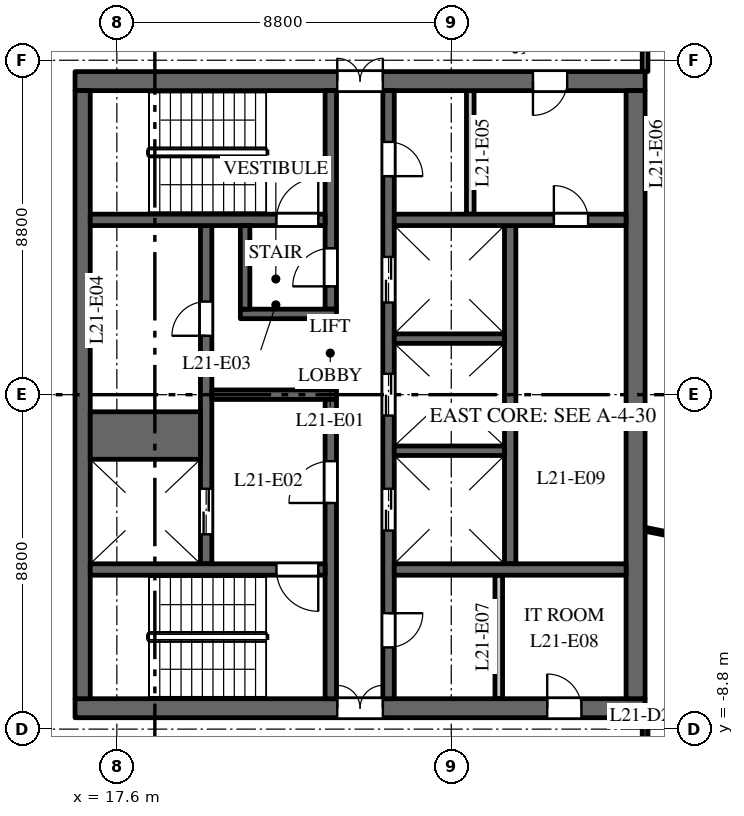
"""IFC4 building model, lengths in metres.
Left out: names, types, materials, properties, quantities, classifications, styles, units other than length and angle.
Written with IfcOpenShell. Run it as: python <this file> out.ifc"""

import sys

from ifc_helpers import new_model, si_unit, direction, frame, frame_2d, origin, place, context, subcontext, project, spatial, rectangle, extrude, element, fill, save


model = new_model("IFC4")
c1 = context("Model", 3, precision=1e-05, world=origin(), true_north=direction((0.0, 1.0)))
c2 = subcontext(c1, "Body", "Model", "MODEL_VIEW")
j1 = project(units=[si_unit("LENGTHUNIT", "METRE"), si_unit("PLANEANGLEUNIT", "RADIAN")], contexts=[c1])
p1 = place(None, origin())
s1 = spatial("IfcSite", under=j1, at=p1, CompositionType="ELEMENT")
p2 = place(p1, origin())
s2 = spatial("IfcBuilding", under=s1, at=p2, CompositionType="ELEMENT")
p3 = place(p2, frame((0.0, 0.0, 96.0)))
s3 = spatial("IfcBuildingStorey", under=s2, at=p3, CompositionType="ELEMENT", Elevation=96.0)
p4 = place(p3, frame((16.5, 8.25, 0.0), z_axis=(0.0, 0.0, 1.0), x_axis=(1.0, 0.0, 0.0)))
e1 = element("IfcWall", 1, at=p4, inside=s3, PredefinedType="SHEAR", context=c2, shape_type="SweptSolid", body=[
    extrude(rectangle(XDim=15.0, YDim=0.5, at=frame_2d((7.5, 0.0))), origin(), (0.0, 0.0, 1.0), 3.7),
])
p5 = place(p4, frame((6.9, 0.0, 0.0)))
e2 = element("IfcOpeningElement", 2, at=p5, cuts=e1, PredefinedType="OPENING", context=c2, shape_type="SweptSolid", body=[
    extrude(rectangle(XDim=1.2, YDim=2.1, at=frame_2d((0.6, 1.05))), frame((0.0, 0.26, 0.0), z_axis=(0.0, -1.0, 0.0), x_axis=(1.0, 0.0, 0.0)), (0.0, 0.0, 1.0), 0.52),
])
p6 = place(p4, frame((12.05, 0.0, 0.0)))
e3 = element("IfcOpeningElement", 3, at=p6, cuts=e1, PredefinedType="OPENING", context=c2, shape_type="SweptSolid", body=[
    extrude(rectangle(XDim=0.9, YDim=2.1, at=frame_2d((0.45, 1.05))), frame((0.0, 0.26, 0.0), z_axis=(0.0, -1.0, 0.0), x_axis=(1.0, 0.0, 0.0)), (0.0, 0.0, 1.0), 0.52),
])
p7 = place(p3, frame((16.5, -8.25, 0.0), z_axis=(0.0, 0.0, 1.0), x_axis=(1.0, 0.0, 0.0)))
e4 = element("IfcWall", 4, at=p7, inside=s3, PredefinedType="SHEAR", context=c2, shape_type="SweptSolid", body=[
    extrude(rectangle(XDim=15.0, YDim=0.5, at=frame_2d((7.5, 0.0))), origin(), (0.0, 0.0, 1.0), 3.7),
])
p8 = place(p7, frame((6.9, 0.0, 0.0)))
e5 = element("IfcOpeningElement", 5, at=p8, cuts=e4, PredefinedType="OPENING", context=c2, shape_type="SweptSolid", body=[
    extrude(rectangle(XDim=1.2, YDim=2.1, at=frame_2d((0.6, 1.05))), frame((0.0, 0.26, 0.0), z_axis=(0.0, -1.0, 0.0), x_axis=(1.0, 0.0, 0.0)), (0.0, 0.0, 1.0), 0.52),
])
p9 = place(p7, frame((12.425, 0.0, 0.0)))
e6 = element("IfcOpeningElement", 6, at=p9, cuts=e4, PredefinedType="OPENING", context=c2, shape_type="SweptSolid", body=[
    extrude(rectangle(XDim=0.9, YDim=2.1, at=frame_2d((0.45, 1.05))), frame((0.0, 0.26, 0.0), z_axis=(0.0, -1.0, 0.0), x_axis=(1.0, 0.0, 0.0)), (0.0, 0.0, 1.0), 0.52),
])
p10 = place(p3, frame((27.95, -4.45, 0.0), z_axis=(0.0, 0.0, 1.0), x_axis=(0.0, 1.0, 0.0)))
e7 = element("IfcWall", 7, at=p10, inside=s3, PredefinedType="SHEAR", context=c2, shape_type="SweptSolid", body=[
    extrude(rectangle(XDim=8.9, YDim=0.3, at=frame_2d((4.45, 0.0))), origin(), (0.0, 0.0, 1.0), 3.7),
])
p11 = place(p3, frame((19.95, -4.45, 0.0), z_axis=(0.0, 0.0, 1.0), x_axis=(0.0, 1.0, 0.0)))
e8 = element("IfcWall", 8, at=p11, inside=s3, PredefinedType="SHEAR", context=c2, shape_type="SweptSolid", body=[
    extrude(rectangle(XDim=8.9, YDim=0.3, at=frame_2d((4.45, 0.0))), origin(), (0.0, 0.0, 1.0), 3.7),
])
p12 = place(p11, frame((0.775, 0.0, 0.0)))
e9 = element("IfcOpeningElement", 9, at=p12, cuts=e8, PredefinedType="OPENING", context=c2, shape_type="SweptSolid", body=[
    extrude(rectangle(XDim=1.2, YDim=2.1, at=frame_2d((0.6, 1.05))), frame((0.0, 0.16, 0.0), z_axis=(0.0, -1.0, 0.0), x_axis=(1.0, 0.0, 0.0)), (0.0, 0.0, 1.0), 0.32),
])
p13 = place(p11, frame((6.0, 0.0, 0.0)))
e10 = element("IfcOpeningElement", 10, at=p13, cuts=e8, PredefinedType="OPENING", context=c2, shape_type="SweptSolid", body=[
    extrude(rectangle(XDim=0.9, YDim=2.1, at=frame_2d((0.45, 1.05))), frame((0.0, 0.16, 0.0), z_axis=(0.0, -1.0, 0.0), x_axis=(1.0, 0.0, 0.0)), (0.0, 0.0, 1.0), 0.32),
])
p14 = place(p3, frame((24.75, -8.0, 0.0), z_axis=(0.0, 0.0, 1.0), x_axis=(0.0, 1.0, 0.0)))
e11 = element("IfcWall", 11, at=p14, inside=s3, PredefinedType="SHEAR", context=c2, shape_type="SweptSolid", body=[
    extrude(rectangle(XDim=16.0, YDim=0.3, at=frame_2d((8.0, 0.0))), origin(), (0.0, 0.0, 1.0), 3.7),
])
p15 = place(p14, frame((4.425, 0.0, 0.0)))
e12 = element("IfcOpeningElement", 12, at=p15, cuts=e11, PredefinedType="OPENING", context=c2, shape_type="SweptSolid", body=[
    extrude(rectangle(XDim=1.1, YDim=2.1, at=frame_2d((0.55, 1.05))), frame((0.0, 0.16, 0.0), z_axis=(0.0, -1.0, 0.0), x_axis=(1.0, 0.0, 0.0)), (0.0, 0.0, 1.0), 0.32),
])
p16 = place(p14, frame((7.45, 0.0, 0.0)))
e13 = element("IfcOpeningElement", 13, at=p16, cuts=e11, PredefinedType="OPENING", context=c2, shape_type="SweptSolid", body=[
    extrude(rectangle(XDim=1.1, YDim=2.1, at=frame_2d((0.55, 1.05))), frame((0.0, 0.16, 0.0), z_axis=(0.0, -1.0, 0.0), x_axis=(1.0, 0.0, 0.0)), (0.0, 0.0, 1.0), 0.32),
])
p17 = place(p14, frame((10.425, 0.0, 0.0)))
e14 = element("IfcOpeningElement", 14, at=p17, cuts=e11, PredefinedType="OPENING", context=c2, shape_type="SweptSolid", body=[
    extrude(rectangle(XDim=1.2, YDim=2.1, at=frame_2d((0.6, 1.05))), frame((0.0, 0.16, 0.0), z_axis=(0.0, -1.0, 0.0), x_axis=(1.0, 0.0, 0.0)), (0.0, 0.0, 1.0), 0.32),
])
p18 = place(p14, frame((13.75, 0.0, 0.0)))
e15 = element("IfcOpeningElement", 15, at=p18, cuts=e11, PredefinedType="OPENING", context=c2, shape_type="SweptSolid", body=[
    extrude(rectangle(XDim=0.9, YDim=2.1, at=frame_2d((0.45, 1.05))), frame((0.0, 0.16, 0.0), z_axis=(0.0, -1.0, 0.0), x_axis=(1.0, 0.0, 0.0)), (0.0, 0.0, 1.0), 0.32),
])
p19 = place(p14, frame((1.35, 0.0, 0.0)))
e16 = element("IfcOpeningElement", 16, at=p19, cuts=e11, PredefinedType="OPENING", context=c2, shape_type="SweptSolid", body=[
    extrude(rectangle(XDim=0.9, YDim=2.1, at=frame_2d((0.45, 1.05))), frame((0.0, 0.16, 0.0), z_axis=(0.0, -1.0, 0.0), x_axis=(1.0, 0.0, 0.0)), (0.0, 0.0, 1.0), 0.32),
])
p20 = place(p3, frame((20.1, 0.0, 0.0), z_axis=(0.0, 0.0, 1.0), x_axis=(1.0, 0.0, 0.0)))
e17 = element("IfcWall", 17, at=p20, inside=s3, PredefinedType="SHEAR", context=c2, shape_type="SweptSolid", body=[
    extrude(rectangle(XDim=3.28, YDim=0.25, at=frame_2d((1.64, 0.0))), origin(), (0.0, 0.0, 1.0), 3.7),
])
p21 = place(p3, frame((16.7, -8.0, 0.0), z_axis=(0.0, 0.0, 1.0), x_axis=(0.0, 1.0, 0.0)))
e18 = element("IfcWall", 18, at=p21, inside=s3, PredefinedType="SHEAR", context=c2, shape_type="SweptSolid", body=[
    extrude(rectangle(XDim=16.0, YDim=0.4, at=frame_2d((8.0, 0.0))), origin(), (0.0, 0.0, 1.0), 3.7),
])
p22 = place(p3, frame((31.25, -8.0, 0.0), z_axis=(0.0, 0.0, 1.0), x_axis=(0.0, 1.0, 0.0)))
e19 = element("IfcWall", 19, at=p22, inside=s3, PredefinedType="SHEAR", context=c2, shape_type="SweptSolid", body=[
    extrude(rectangle(XDim=16.0, YDim=0.5, at=frame_2d((8.0, 0.0))), origin(), (0.0, 0.0, 1.0), 3.7),
])
p23 = place(p3, frame((24.9, 4.6, 0.0), z_axis=(0.0, 0.0, 1.0), x_axis=(1.0, 0.0, 0.0)))
e20 = element("IfcWall", 20, at=p23, inside=s3, PredefinedType="SHEAR", context=c2, shape_type="SweptSolid", body=[
    extrude(rectangle(XDim=6.1, YDim=0.3, at=frame_2d((3.05, 0.0))), origin(), (0.0, 0.0, 1.0), 3.7),
])
p24 = place(p23, frame((4.2, 0.0, 0.0)))
e21 = element("IfcOpeningElement", 21, at=p24, cuts=e20, PredefinedType="OPENING", context=c2, shape_type="SweptSolid", body=[
    extrude(rectangle(XDim=0.9, YDim=2.1, at=frame_2d((0.45, 1.05))), frame((0.0, 0.16, 0.0), z_axis=(0.0, -1.0, 0.0), x_axis=(1.0, 0.0, 0.0)), (0.0, 0.0, 1.0), 0.32),
])
for number, where, z_axis, x_axis in (
    (22, (26.9, 4.75, 0.0), (0.0, 0.0, 1.0), (0.0, 1.0, 0.0)),
    (23, (27.65, -8.0, 0.0), (0.0, 0.0, 1.0), (0.0, 1.0, 0.0)),
):
    element("IfcWall", number, at=place(p3, frame(where, z_axis=z_axis, x_axis=x_axis)), inside=s3, PredefinedType="PARTITIONING", context=c2, shape_type="SweptSolid", body=[
        extrude(rectangle(XDim=3.25, YDim=0.2, at=frame_2d((1.625, 0.0))), origin(), (0.0, 0.0, 1.0), 3.7),
    ])
p25 = place(p3, frame((24.9, -4.6, 0.0), z_axis=(0.0, 0.0, 1.0), x_axis=(1.0, 0.0, 0.0)))
e24 = element("IfcWall", 24, at=p25, inside=s3, PredefinedType="SHEAR", context=c2, shape_type="SweptSolid", body=[
    extrude(rectangle(XDim=6.1, YDim=0.3, at=frame_2d((3.05, 0.0))), origin(), (0.0, 0.0, 1.0), 3.7),
])
p26 = place(p3, frame((16.9, -1.075, 0.0), z_axis=(0.0, 0.0, 1.0), x_axis=(1.0, 0.0, 0.0)))
e25 = element("IfcWall", 25, at=p26, inside=s3, PredefinedType="SHEAR", context=c2, shape_type="SweptSolid", body=[
    extrude(rectangle(XDim=2.9, YDim=1.25, at=frame_2d((1.45, 0.0))), origin(), (0.0, 0.0, 1.0), 3.7),
])
for number, where, z_axis, x_axis in (
    (26, (24.9, -1.475, 0.0), (0.0, 0.0, 1.0), (1.0, 0.0, 0.0)),
    (27, (24.9, 1.475, 0.0), (0.0, 0.0, 1.0), (1.0, 0.0, 0.0)),
):
    element("IfcWall", number, at=place(p3, frame(where, z_axis=z_axis, x_axis=x_axis)), inside=s3, PredefinedType="SHEAR", context=c2, shape_type="SweptSolid", body=[
        extrude(rectangle(XDim=2.9, YDim=0.25, at=frame_2d((1.45, 0.0))), origin(), (0.0, 0.0, 1.0), 3.7),
    ])
p27 = place(p3, frame((23.23, 2.25, 0.0), z_axis=(0.0, 0.0, 1.0), x_axis=(0.0, 1.0, 0.0)))
e28 = element("IfcWall", 28, at=p27, inside=s3, PredefinedType="SHEAR", context=c2, shape_type="SweptSolid", body=[
    extrude(rectangle(XDim=5.75, YDim=0.3, at=frame_2d((2.875, 0.0))), origin(), (0.0, 0.0, 1.0), 3.7),
])
p28 = place(p27, frame((0.6, 0.0, 0.0)))
e29 = element("IfcOpeningElement", 29, at=p28, cuts=e28, PredefinedType="OPENING", context=c2, shape_type="SweptSolid", body=[
    extrude(rectangle(XDim=1.0, YDim=2.1, at=frame_2d((0.5, 1.05))), frame((0.0, 0.16, 0.0), z_axis=(0.0, -1.0, 0.0), x_axis=(1.0, 0.0, 0.0)), (0.0, 0.0, 1.0), 0.32),
])
p29 = place(p3, frame((23.23, -8.0, 0.0), z_axis=(0.0, 0.0, 1.0), x_axis=(0.0, 1.0, 0.0)))
e30 = element("IfcWall", 30, at=p29, inside=s3, PredefinedType="SHEAR", context=c2, shape_type="SweptSolid", body=[
    extrude(rectangle(XDim=7.875, YDim=0.3, at=frame_2d((3.938, 0.0))), origin(), (0.0, 0.0, 1.0), 3.7),
])
p30 = place(p29, frame((5.15, 0.0, 0.0)))
e31 = element("IfcOpeningElement", 31, at=p30, cuts=e30, PredefinedType="OPENING", context=c2, shape_type="SweptSolid", body=[
    extrude(rectangle(XDim=1.1, YDim=2.1, at=frame_2d((0.55, 1.05))), frame((0.0, 0.16, 0.0), z_axis=(0.0, -1.0, 0.0), x_axis=(1.0, 0.0, 0.0)), (0.0, 0.0, 1.0), 0.32),
])
p31 = place(p3, frame((16.9, 4.6, 0.0), z_axis=(0.0, 0.0, 1.0), x_axis=(1.0, 0.0, 0.0)))
e32 = element("IfcWall", 32, at=p31, inside=s3, PredefinedType="SHEAR", context=c2, shape_type="SweptSolid", body=[
    extrude(rectangle(XDim=6.18, YDim=0.3, at=frame_2d((3.09, 0.0))), origin(), (0.0, 0.0, 1.0), 3.7),
])
p32 = place(p31, frame((4.9, 0.0, 0.0)))
e33 = element("IfcOpeningElement", 33, at=p32, cuts=e32, PredefinedType="OPENING", context=c2, shape_type="SweptSolid", body=[
    extrude(rectangle(XDim=1.1, YDim=2.1, at=frame_2d((0.55, 1.05))), frame((0.0, 0.16, 0.0), z_axis=(0.0, -1.0, 0.0), x_axis=(1.0, 0.0, 0.0)), (0.0, 0.0, 1.0), 0.32),
])
p33 = place(p3, frame((16.9, -4.6, 0.0), z_axis=(0.0, 0.0, 1.0), x_axis=(1.0, 0.0, 0.0)))
e34 = element("IfcWall", 34, at=p33, inside=s3, PredefinedType="SHEAR", context=c2, shape_type="SweptSolid", body=[
    extrude(rectangle(XDim=6.18, YDim=0.3, at=frame_2d((3.09, 0.0))), origin(), (0.0, 0.0, 1.0), 3.7),
])
p34 = place(p33, frame((4.9, 0.0, 0.0)))
e35 = element("IfcOpeningElement", 35, at=p34, cuts=e34, PredefinedType="OPENING", context=c2, shape_type="SweptSolid", body=[
    extrude(rectangle(XDim=1.1, YDim=2.1, at=frame_2d((0.55, 1.05))), frame((0.0, 0.16, 0.0), z_axis=(0.0, -1.0, 0.0), x_axis=(1.0, 0.0, 0.0)), (0.0, 0.0, 1.0), 0.32),
])
p35 = place(p3, frame((20.85, 2.125, 0.0), z_axis=(0.0, 0.0, 1.0), x_axis=(1.0, 0.0, 0.0)))
e36 = element("IfcWall", 36, at=p35, inside=s3, PredefinedType="SHEAR", context=c2, shape_type="SweptSolid", body=[
    extrude(rectangle(XDim=2.53, YDim=0.25, at=frame_2d((1.265, 0.0))), origin(), (0.0, 0.0, 1.0), 3.7),
])
p36 = place(p3, frame((20.975, 2.25, 0.0), z_axis=(0.0, 0.0, 1.0), x_axis=(0.0, 1.0, 0.0)))
e37 = element("IfcWall", 37, at=p36, inside=s3, PredefinedType="SHEAR", context=c2, shape_type="SweptSolid", body=[
    extrude(rectangle(XDim=2.2, YDim=0.25, at=frame_2d((1.1, 0.0))), origin(), (0.0, 0.0, 1.0), 3.7),
])
p37 = place(p3, frame((31.5, -10.7, 0.0), z_axis=(0.0, 0.0, 1.0), x_axis=(0.0, 1.0, 0.0)))
e38 = element("IfcWall", 38, at=p37, inside=s3, PredefinedType="PARTITIONING", context=c2, shape_type="SweptSolid", body=[
    extrude(rectangle(XDim=2.2, YDim=0.15, at=frame_2d((1.1, 0.0))), origin(), (0.0, 0.0, 1.0), 2.9),
])
p38 = place(p37, frame((0.65, 0.0, 0.0)))
e39 = element("IfcOpeningElement", 39, at=p38, cuts=e38, PredefinedType="OPENING", context=c2, shape_type="SweptSolid", body=[
    extrude(rectangle(XDim=1.0, YDim=2.1, at=frame_2d((0.5, 1.05))), frame((0.0, 0.085, 0.0), z_axis=(0.0, -1.0, 0.0), x_axis=(1.0, 0.0, 0.0)), (0.0, 0.0, 1.0), 0.17),
])
p39 = place(p3, frame((31.5, -3.542, 0.0), z_axis=(0.0, 0.0, 1.0), x_axis=(0.980357474535, -0.197228857227, 0.0)))
e40 = element("IfcWall", 40, at=p39, inside=s3, PredefinedType="PARTITIONING", context=c2, shape_type="SweptSolid", body=[
    extrude(rectangle(XDim=4.092, YDim=0.1, at=frame_2d((2.046, 0.0))), origin(), (0.0, 0.0, 1.0), 2.9),
])
p40 = place(p3, frame((31.5, 8.5, 0.0), z_axis=(0.0, 0.0, 1.0), x_axis=(0.0, 1.0, 0.0)))
e41 = element("IfcWall", 41, at=p40, inside=s3, PredefinedType="PARTITIONING", context=c2, shape_type="SweptSolid", body=[
    extrude(rectangle(XDim=2.2, YDim=0.15, at=frame_2d((1.1, 0.0))), origin(), (0.0, 0.0, 1.0), 2.9),
])
p41 = place(p40, frame((0.65, 0.0, 0.0)))
e42 = element("IfcOpeningElement", 42, at=p41, cuts=e41, PredefinedType="OPENING", context=c2, shape_type="SweptSolid", body=[
    extrude(rectangle(XDim=1.0, YDim=2.1, at=frame_2d((0.5, 1.05))), frame((0.0, 0.085, 0.0), z_axis=(0.0, -1.0, 0.0), x_axis=(1.0, 0.0, 0.0)), (0.0, 0.0, 1.0), 0.17),
])
p42 = place(p12, origin())
e43 = element("IfcDoor", 43, at=p42, inside=s3, OperationType="DOUBLE_DOOR_SLIDING", PredefinedType="DOOR", context=c2, shape_type="SweptSolid", body=[
    extrude(rectangle(XDim=1.2, YDim=2.1, at=frame_2d((0.6, 1.05))), frame((0.0, 0.025, 0.0), z_axis=(0.0, -1.0, 0.0), x_axis=(1.0, 0.0, 0.0)), (0.0, 0.0, 1.0), 0.05),
])
fill(e9, e43)
p43 = place(p15, origin())
e44 = element("IfcDoor", 44, at=p43, inside=s3, OperationType="DOUBLE_DOOR_SLIDING", PredefinedType="DOOR", context=c2, shape_type="SweptSolid", body=[
    extrude(rectangle(XDim=1.1, YDim=2.1, at=frame_2d((0.55, 1.05))), frame((0.0, 0.025, 0.0), z_axis=(0.0, -1.0, 0.0), x_axis=(1.0, 0.0, 0.0)), (0.0, 0.0, 1.0), 0.05),
])
fill(e12, e44)
p44 = place(p16, origin())
e45 = element("IfcDoor", 45, at=p44, inside=s3, OperationType="DOUBLE_DOOR_SLIDING", PredefinedType="DOOR", context=c2, shape_type="SweptSolid", body=[
    extrude(rectangle(XDim=1.1, YDim=2.1, at=frame_2d((0.55, 1.05))), frame((0.0, 0.025, 0.0), z_axis=(0.0, -1.0, 0.0), x_axis=(1.0, 0.0, 0.0)), (0.0, 0.0, 1.0), 0.05),
])
fill(e13, e45)
p45 = place(p17, origin())
e46 = element("IfcDoor", 46, at=p45, inside=s3, OperationType="DOUBLE_DOOR_SLIDING", PredefinedType="DOOR", context=c2, shape_type="SweptSolid", body=[
    extrude(rectangle(XDim=1.2, YDim=2.1, at=frame_2d((0.6, 1.05))), frame((0.0, 0.025, 0.0), z_axis=(0.0, -1.0, 0.0), x_axis=(1.0, 0.0, 0.0)), (0.0, 0.0, 1.0), 0.05),
])
fill(e14, e46)
p46 = place(p32, origin())
e47 = element("IfcDoor", 47, at=p46, inside=s3, OperationType="SINGLE_SWING_LEFT", PredefinedType="DOOR", context=c2, shape_type="SweptSolid", body=[
    extrude(rectangle(XDim=1.1, YDim=2.1, at=frame_2d((0.55, 1.05))), frame((0.0, 0.025, 0.0), z_axis=(0.0, -1.0, 0.0), x_axis=(1.0, 0.0, 0.0)), (0.0, 0.0, 1.0), 0.05),
])
fill(e33, e47)
p47 = place(p34, origin())
e48 = element("IfcDoor", 48, at=p47, inside=s3, OperationType="SINGLE_SWING_RIGHT", PredefinedType="DOOR", context=c2, shape_type="SweptSolid", body=[
    extrude(rectangle(XDim=1.1, YDim=2.1, at=frame_2d((0.55, 1.05))), frame((0.0, 0.025, 0.0), z_axis=(0.0, -1.0, 0.0), x_axis=(1.0, 0.0, 0.0)), (0.0, 0.0, 1.0), 0.05),
])
fill(e35, e48)
p48 = place(p30, origin())
e49 = element("IfcDoor", 49, at=p48, inside=s3, OperationType="SINGLE_SWING_RIGHT", PredefinedType="DOOR", context=c2, shape_type="SweptSolid", body=[
    extrude(rectangle(XDim=1.1, YDim=2.1, at=frame_2d((0.55, 1.05))), frame((0.0, 0.025, 0.0), z_axis=(0.0, -1.0, 0.0), x_axis=(1.0, 0.0, 0.0)), (0.0, 0.0, 1.0), 0.05),
])
fill(e31, e49)
p49 = place(p28, origin())
e50 = element("IfcDoor", 50, at=p49, inside=s3, OperationType="SINGLE_SWING_RIGHT", PredefinedType="DOOR", context=c2, shape_type="SweptSolid", body=[
    extrude(rectangle(XDim=1.0, YDim=2.1, at=frame_2d((0.5, 1.05))), frame((0.0, 0.025, 0.0), z_axis=(0.0, -1.0, 0.0), x_axis=(1.0, 0.0, 0.0)), (0.0, 0.0, 1.0), 0.05),
])
fill(e29, e50)
p50 = place(p5, origin())
e51 = element("IfcDoor", 51, at=p50, inside=s3, OperationType="DOUBLE_DOOR_DOUBLE_SWING", PredefinedType="DOOR", context=c2, shape_type="SweptSolid", body=[
    extrude(rectangle(XDim=1.2, YDim=2.1, at=frame_2d((0.6, 1.05))), frame((0.0, 0.025, 0.0), z_axis=(0.0, -1.0, 0.0), x_axis=(1.0, 0.0, 0.0)), (0.0, 0.0, 1.0), 0.05),
])
fill(e2, e51)
p51 = place(p8, origin())
e52 = element("IfcDoor", 52, at=p51, inside=s3, OperationType="DOUBLE_DOOR_DOUBLE_SWING", PredefinedType="DOOR", context=c2, shape_type="SweptSolid", body=[
    extrude(rectangle(XDim=1.2, YDim=2.1, at=frame_2d((0.6, 1.05))), frame((0.0, 0.025, 0.0), z_axis=(0.0, -1.0, 0.0), x_axis=(1.0, 0.0, 0.0)), (0.0, 0.0, 1.0), 0.05),
])
fill(e5, e52)
p52 = place(p13, origin())
e53 = element("IfcDoor", 53, at=p52, inside=s3, OperationType="SINGLE_SWING_RIGHT", PredefinedType="DOOR", context=c2, shape_type="SweptSolid", body=[
    extrude(rectangle(XDim=0.9, YDim=2.1, at=frame_2d((0.45, 1.05))), frame((0.0, 0.025, 0.0), z_axis=(0.0, -1.0, 0.0), x_axis=(1.0, 0.0, 0.0)), (0.0, 0.0, 1.0), 0.05),
])
fill(e10, e53)
p53 = place(p18, origin())
e54 = element("IfcDoor", 54, at=p53, inside=s3, OperationType="SINGLE_SWING_LEFT", PredefinedType="DOOR", context=c2, shape_type="SweptSolid", body=[
    extrude(rectangle(XDim=0.9, YDim=2.1, at=frame_2d((0.45, 1.05))), frame((0.0, 0.025, 0.0), z_axis=(0.0, -1.0, 0.0), x_axis=(1.0, 0.0, 0.0)), (0.0, 0.0, 1.0), 0.05),
])
fill(e15, e54)
p54 = place(p6, origin())
e55 = element("IfcDoor", 55, at=p54, inside=s3, OperationType="SINGLE_SWING_LEFT", PredefinedType="DOOR", context=c2, shape_type="SweptSolid", body=[
    extrude(rectangle(XDim=0.9, YDim=2.1, at=frame_2d((0.45, 1.05))), frame((0.0, 0.025, 0.0), z_axis=(0.0, -1.0, 0.0), x_axis=(1.0, 0.0, 0.0)), (0.0, 0.0, 1.0), 0.05),
])
fill(e3, e55)
p55 = place(p19, origin())
e56 = element("IfcDoor", 56, at=p55, inside=s3, OperationType="SINGLE_SWING_RIGHT", PredefinedType="DOOR", context=c2, shape_type="SweptSolid", body=[
    extrude(rectangle(XDim=0.9, YDim=2.1, at=frame_2d((0.45, 1.05))), frame((0.0, 0.025, 0.0), z_axis=(0.0, -1.0, 0.0), x_axis=(1.0, 0.0, 0.0)), (0.0, 0.0, 1.0), 0.05),
])
fill(e16, e56)
p56 = place(p9, origin())
e57 = element("IfcDoor", 57, at=p56, inside=s3, OperationType="SINGLE_SWING_RIGHT", PredefinedType="DOOR", context=c2, shape_type="SweptSolid", body=[
    extrude(rectangle(XDim=0.9, YDim=2.1, at=frame_2d((0.45, 1.05))), frame((0.0, 0.025, 0.0), z_axis=(0.0, -1.0, 0.0), x_axis=(1.0, 0.0, 0.0)), (0.0, 0.0, 1.0), 0.05),
])
fill(e6, e57)
p57 = place(p24, origin())
e58 = element("IfcDoor", 58, at=p57, inside=s3, OperationType="SINGLE_SWING_RIGHT", PredefinedType="DOOR", context=c2, shape_type="SweptSolid", body=[
    extrude(rectangle(XDim=0.9, YDim=2.1, at=frame_2d((0.45, 1.05))), frame((0.0, 0.025, 0.0), z_axis=(0.0, -1.0, 0.0), x_axis=(1.0, 0.0, 0.0)), (0.0, 0.0, 1.0), 0.05),
])
fill(e21, e58)
save(model, sys.argv[1])
